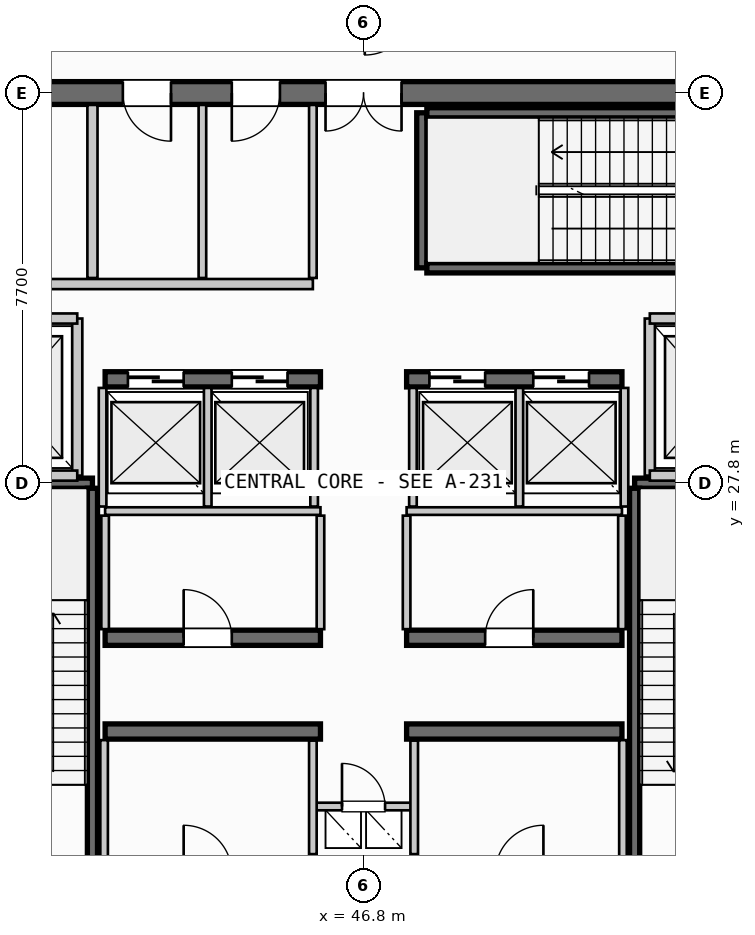
"""IFC4 building model, lengths in metres.
Left out: names, types, materials, properties, quantities, classifications, styles, units other than length and angle.
Written with IfcOpenShell. Run it as: python <this file> out.ifc"""

import sys

from ifc_helpers import new_model, si_unit, direction, frame, frame_2d, origin, place, context, subcontext, project, spatial, rectangle, extrude, source, transform, mapped, element, fill, save


model = new_model("IFC4")
c1 = context("Model", 3, precision=1e-05, world=origin(), true_north=direction((0.0, 1.0)))
c2 = subcontext(c1, "Body", "Model", "MODEL_VIEW")
j1 = project(units=[si_unit("LENGTHUNIT", "METRE"), si_unit("PLANEANGLEUNIT", "RADIAN")], contexts=[c1])
p1 = place(None, origin())
s1 = spatial("IfcSite", under=j1, at=p1, CompositionType="ELEMENT")
p2 = place(p1, origin())
s2 = spatial("IfcBuilding", under=s1, at=p2, CompositionType="ELEMENT")
p3 = place(p2, frame((0.0, 0.0, 223.6)))
s3 = spatial("IfcBuildingStorey", under=s2, at=p3, CompositionType="ELEMENT", Elevation=223.6)
p4 = place(p3, frame((55.6, 35.5, 0.0), z_axis=(0.0, 0.0, 1.0), x_axis=(-1.0, 0.0, 0.0)))
e1 = element("IfcWall", 1, at=p4, inside=s3, PredefinedType="SHEAR", context=c2, shape_type="SweptSolid", body=[
    extrude(rectangle(XDim=17.6, YDim=0.45, at=frame_2d((8.8, 0.0))), origin(), (0.0, 0.0, 1.0), 4.38),
])
p5 = place(p4, frame((8.05, 0.0, 0.0)))
e2 = element("IfcOpeningElement", 2, at=p5, cuts=e1, PredefinedType="OPENING", context=c2, shape_type="SweptSolid", body=[
    extrude(rectangle(XDim=1.5, YDim=2.2, at=frame_2d((0.75, 1.1))), frame((0.0, 0.235, 0.0), z_axis=(0.0, -1.0, 0.0), x_axis=(1.0, 0.0, 0.0)), (0.0, 0.0, 1.0), 0.47),
])
p6 = place(p4, frame((15.1, 0.0, 0.0)))
e3 = element("IfcOpeningElement", 3, at=p6, cuts=e1, PredefinedType="OPENING", context=c2, shape_type="SweptSolid", body=[
    extrude(rectangle(XDim=0.95, YDim=2.15, at=frame_2d((0.475, 1.075))), frame((0.0, 0.235, 0.0), z_axis=(0.0, -1.0, 0.0), x_axis=(1.0, 0.0, 0.0)), (0.0, 0.0, 1.0), 0.47),
])
p7 = place(p4, frame((12.6, 0.0, 0.0)))
e4 = element("IfcOpeningElement", 4, at=p7, cuts=e1, PredefinedType="OPENING", context=c2, shape_type="SweptSolid", body=[
    extrude(rectangle(XDim=0.95, YDim=2.15, at=frame_2d((0.475, 1.075))), frame((0.0, 0.235, 0.0), z_axis=(0.0, -1.0, 0.0), x_axis=(1.0, 0.0, 0.0)), (0.0, 0.0, 1.0), 0.47),
])
p8 = place(p4, frame((10.45, 0.0, 0.0)))
e5 = element("IfcOpeningElement", 5, at=p8, cuts=e1, PredefinedType="OPENING", context=c2, shape_type="SweptSolid", body=[
    extrude(rectangle(XDim=0.95, YDim=2.15, at=frame_2d((0.475, 1.075))), frame((0.0, 0.235, 0.0), z_axis=(0.0, -1.0, 0.0), x_axis=(1.0, 0.0, 0.0)), (0.0, 0.0, 1.0), 0.47),
])
for number, where, z_axis, x_axis in (
    (6, (41.7, 22.9, 0.0), (0.0, 0.0, 1.0), (1.0, 0.0, 0.0)),
    (7, (47.65, 22.9, 0.0), (0.0, 0.0, 1.0), (1.0, 0.0, 0.0)),
):
    element("IfcWall", number, at=place(p3, frame(where, z_axis=z_axis, x_axis=x_axis)), inside=s3, PredefinedType="SHEAR", context=c2, shape_type="SweptSolid", body=[
        extrude(rectangle(XDim=4.25, YDim=0.3, at=frame_2d((2.125, 0.0))), origin(), (0.0, 0.0, 1.0), 4.38),
    ])
p9 = place(p3, frame((41.7, 24.75, 0.0), z_axis=(0.0, 0.0, 1.0), x_axis=(1.0, 0.0, 0.0)))
e8 = element("IfcWall", 8, at=p9, inside=s3, PredefinedType="SHEAR", context=c2, shape_type="SweptSolid", body=[
    extrude(rectangle(XDim=4.25, YDim=0.3, at=frame_2d((2.125, 0.0))), origin(), (0.0, 0.0, 1.0), 4.38),
])
p10 = place(p9, frame((1.55, 0.0, 0.0)))
e9 = element("IfcOpeningElement", 9, at=p10, cuts=e8, PredefinedType="OPENING", context=c2, shape_type="SweptSolid", body=[
    extrude(rectangle(XDim=0.95, YDim=2.15, at=frame_2d((0.475, 1.075))), frame((0.0, 0.16, 0.0), z_axis=(0.0, -1.0, 0.0), x_axis=(1.0, 0.0, 0.0)), (0.0, 0.0, 1.0), 0.32),
])
p11 = place(p3, frame((47.65, 24.75, 0.0), z_axis=(0.0, 0.0, 1.0), x_axis=(1.0, 0.0, 0.0)))
e10 = element("IfcWall", 10, at=p11, inside=s3, PredefinedType="SHEAR", context=c2, shape_type="SweptSolid", body=[
    extrude(rectangle(XDim=4.25, YDim=0.3, at=frame_2d((2.125, 0.0))), origin(), (0.0, 0.0, 1.0), 4.38),
])
p12 = place(p11, frame((1.55, 0.0, 0.0)))
e11 = element("IfcOpeningElement", 11, at=p12, cuts=e10, PredefinedType="OPENING", context=c2, shape_type="SweptSolid", body=[
    extrude(rectangle(XDim=0.95, YDim=2.15, at=frame_2d((0.475, 1.075))), frame((0.0, 0.16, 0.0), z_axis=(0.0, -1.0, 0.0), x_axis=(1.0, 0.0, 0.0)), (0.0, 0.0, 1.0), 0.32),
])
p13 = place(p3, frame((41.7, 29.85, 0.0), z_axis=(0.0, 0.0, 1.0), x_axis=(1.0, 0.0, 0.0)))
e12 = element("IfcWall", 12, at=p13, inside=s3, PredefinedType="SHEAR", context=c2, shape_type="SweptSolid", body=[
    extrude(rectangle(XDim=4.25, YDim=0.3, at=frame_2d((2.125, 0.0))), origin(), (0.0, 0.0, 1.0), 4.38),
])
p14 = place(p13, frame((0.45, 0.0, 0.0)))
e13 = element("IfcOpeningElement", 13, at=p14, cuts=e12, PredefinedType="OPENING", context=c2, shape_type="SweptSolid", body=[
    extrude(rectangle(XDim=1.1, YDim=2.2, at=frame_2d((0.55, 1.1))), frame((0.0, 0.16, 0.0), z_axis=(0.0, -1.0, 0.0), x_axis=(1.0, 0.0, 0.0)), (0.0, 0.0, 1.0), 0.32),
])
p15 = place(p13, frame((2.5, 0.0, 0.0)))
e14 = element("IfcOpeningElement", 14, at=p15, cuts=e12, PredefinedType="OPENING", context=c2, shape_type="SweptSolid", body=[
    extrude(rectangle(XDim=1.1, YDim=2.2, at=frame_2d((0.55, 1.1))), frame((0.0, 0.16, 0.0), z_axis=(0.0, -1.0, 0.0), x_axis=(1.0, 0.0, 0.0)), (0.0, 0.0, 1.0), 0.32),
])
p16 = place(p3, frame((47.65, 29.85, 0.0), z_axis=(0.0, 0.0, 1.0), x_axis=(1.0, 0.0, 0.0)))
e15 = element("IfcWall", 15, at=p16, inside=s3, PredefinedType="SHEAR", context=c2, shape_type="SweptSolid", body=[
    extrude(rectangle(XDim=4.25, YDim=0.3, at=frame_2d((2.125, 0.0))), origin(), (0.0, 0.0, 1.0), 4.38),
])
p17 = place(p16, frame((0.45, 0.0, 0.0)))
e16 = element("IfcOpeningElement", 16, at=p17, cuts=e15, PredefinedType="OPENING", context=c2, shape_type="SweptSolid", body=[
    extrude(rectangle(XDim=1.1, YDim=2.2, at=frame_2d((0.55, 1.1))), frame((0.0, 0.16, 0.0), z_axis=(0.0, -1.0, 0.0), x_axis=(1.0, 0.0, 0.0)), (0.0, 0.0, 1.0), 0.32),
])
p18 = place(p16, frame((2.5, 0.0, 0.0)))
e17 = element("IfcOpeningElement", 17, at=p18, cuts=e15, PredefinedType="OPENING", context=c2, shape_type="SweptSolid", body=[
    extrude(rectangle(XDim=1.1, YDim=2.2, at=frame_2d((0.55, 1.1))), frame((0.0, 0.16, 0.0), z_axis=(0.0, -1.0, 0.0), x_axis=(1.0, 0.0, 0.0)), (0.0, 0.0, 1.0), 0.32),
])
p19 = place(p3, frame((38.39, 27.8, 0.0), z_axis=(0.0, 0.0, 1.0), x_axis=(1.0, 0.0, 0.0)))
e18 = element("IfcWall", 18, at=p19, inside=s3, PredefinedType="SHEAR", context=c2, shape_type="SweptSolid", body=[
    extrude(rectangle(XDim=3.06, YDim=0.2, at=frame_2d((1.53, 0.0))), origin(), (0.0, 0.0, 1.0), 4.38),
])
p20 = place(p3, frame((41.45, 27.7, 0.0), z_axis=(0.0, 0.0, 1.0), x_axis=(0.0, -1.0, 0.0)))
e19 = element("IfcWall", 19, at=p20, inside=s3, PredefinedType="SHEAR", context=c2, shape_type="SweptSolid", body=[
    extrude(rectangle(XDim=7.35, YDim=0.2, at=frame_2d((3.675, 0.0))), origin(), (0.0, 0.0, 1.0), 4.38),
])
p21 = place(p3, frame((52.15, 27.8, 0.0), z_axis=(0.0, 0.0, 1.0), x_axis=(1.0, 0.0, 0.0)))
e20 = element("IfcWall", 20, at=p21, inside=s3, PredefinedType="SHEAR", context=c2, shape_type="SweptSolid", body=[
    extrude(rectangle(XDim=3.06, YDim=0.2, at=frame_2d((1.53, 0.0))), origin(), (0.0, 0.0, 1.0), 4.38),
])
p22 = place(p3, frame((52.15, 20.35, 0.0), z_axis=(0.0, 0.0, 1.0), x_axis=(0.0, 1.0, 0.0)))
e21 = element("IfcWall", 21, at=p22, inside=s3, PredefinedType="SHEAR", context=c2, shape_type="SweptSolid", body=[
    extrude(rectangle(XDim=7.35, YDim=0.2, at=frame_2d((3.675, 0.0))), origin(), (0.0, 0.0, 1.0), 4.38),
])
p23 = place(p3, frame((47.95, 32.05, 0.0), z_axis=(0.0, 0.0, 1.0), x_axis=(0.0, 1.0, 0.0)))
e22 = element("IfcWall", 22, at=p23, inside=s3, PredefinedType="SHEAR", context=c2, shape_type="SweptSolid", body=[
    extrude(rectangle(XDim=3.06, YDim=0.2, at=frame_2d((1.53, 0.0))), origin(), (0.0, 0.0, 1.0), 4.38),
])
for number, where, z_axis, x_axis in (
    (23, (48.05, 35.11, 0.0), (0.0, 0.0, 1.0), (1.0, 0.0, 0.0)),
    (24, (55.4, 32.05, 0.0), (0.0, 0.0, 1.0), (-1.0, 0.0, 0.0)),
):
    element("IfcWall", number, at=place(p3, frame(where, z_axis=z_axis, x_axis=x_axis)), inside=s3, PredefinedType="SHEAR", context=c2, shape_type="SweptSolid", body=[
        extrude(rectangle(XDim=7.35, YDim=0.2, at=frame_2d((3.675, 0.0))), origin(), (0.0, 0.0, 1.0), 4.38),
    ])
p24 = place(p3, frame((45.8, 21.42, 0.0), z_axis=(0.0, 0.0, 1.0), x_axis=(1.0, 0.0, 0.0)))
e25 = element("IfcWall", 25, at=p24, inside=s3, PredefinedType="PARTITIONING", context=c2, shape_type="SweptSolid", body=[
    extrude(rectangle(XDim=2.0, YDim=0.15, at=frame_2d((1.0, 0.0))), origin(), (0.0, 0.0, 1.0), 2.455),
])
p25 = place(p24, frame((0.575, 0.0, 0.0)))
e26 = element("IfcOpeningElement", 26, at=p25, cuts=e25, PredefinedType="OPENING", context=c2, shape_type="SweptSolid", body=[
    extrude(rectangle(XDim=0.85, YDim=2.15, at=frame_2d((0.425, 1.075))), frame((0.0, 0.085, 0.0), z_axis=(0.0, -1.0, 0.0), x_axis=(1.0, 0.0, 0.0)), (0.0, 0.0, 1.0), 0.17),
])
for number, where, z_axis, x_axis in (
    (27, (45.8, 20.48, 0.0), (0.0, 0.0, 1.0), (0.0, 1.0, 0.0)),
    (28, (47.8, 20.48, 0.0), (0.0, 0.0, 1.0), (0.0, 1.0, 0.0)),
):
    element("IfcWall", number, at=place(p3, frame(where, z_axis=z_axis, x_axis=x_axis)), inside=s3, PredefinedType="PARTITIONING", context=c2, shape_type="SweptSolid", body=[
        extrude(rectangle(XDim=2.24, YDim=0.15, at=frame_2d((1.12, 0.0))), origin(), (0.0, 0.0, 1.0), 2.455),
    ])
p26 = place(p3, frame((41.15, 27.95, 0.0), z_axis=(0.0, 0.0, 1.0), x_axis=(0.0, 1.0, 0.0)))
e29 = element("IfcWall", 29, at=p26, inside=s3, PredefinedType="PARTITIONING", context=c2, shape_type="SweptSolid", body=[
    extrude(rectangle(XDim=3.1, YDim=0.2, at=frame_2d((1.55, 0.0))), origin(), (0.0, 0.0, 1.0), 2.455),
])
for number, where, z_axis, x_axis in (
    (30, (38.235, 27.95, 0.0), (0.0, 0.0, 1.0), (1.0, 0.0, 0.0)),
    (31, (38.235, 31.05, 0.0), (0.0, 0.0, 1.0), (1.0, 0.0, 0.0)),
):
    element("IfcWall", number, at=place(p3, frame(where, z_axis=z_axis, x_axis=x_axis)), inside=s3, PredefinedType="PARTITIONING", context=c2, shape_type="SweptSolid", body=[
        extrude(rectangle(XDim=2.915, YDim=0.2, at=frame_2d((1.458, 0.0))), origin(), (0.0, 0.0, 1.0), 2.455),
    ])
p27 = place(p3, frame((52.45, 27.95, 0.0), z_axis=(0.0, 0.0, 1.0), x_axis=(0.0, 1.0, 0.0)))
e32 = element("IfcWall", 32, at=p27, inside=s3, PredefinedType="PARTITIONING", context=c2, shape_type="SweptSolid", body=[
    extrude(rectangle(XDim=3.1, YDim=0.2, at=frame_2d((1.55, 0.0))), origin(), (0.0, 0.0, 1.0), 2.455),
])
for number, where, z_axis, x_axis in (
    (33, (52.45, 27.95, 0.0), (0.0, 0.0, 1.0), (1.0, 0.0, 0.0)),
    (34, (52.45, 31.05, 0.0), (0.0, 0.0, 1.0), (1.0, 0.0, 0.0)),
):
    element("IfcWall", number, at=place(p3, frame(where, z_axis=z_axis, x_axis=x_axis)), inside=s3, PredefinedType="PARTITIONING", context=c2, shape_type="SweptSolid", body=[
        extrude(rectangle(XDim=2.915, YDim=0.2, at=frame_2d((1.458, 0.0))), origin(), (0.0, 0.0, 1.0), 2.455),
    ])
for number, where, z_axis, x_axis in (
    (35, (41.68, 20.335, 0.0), (0.0, 0.0, 1.0), (0.0, 1.0, 0.0)),
    (36, (51.92, 20.335, 0.0), (0.0, 0.0, 1.0), (0.0, 1.0, 0.0)),
):
    element("IfcWall", number, at=place(p3, frame(where, z_axis=z_axis, x_axis=x_axis)), inside=s3, PredefinedType="PARTITIONING", context=c2, shape_type="SweptSolid", body=[
        extrude(rectangle(XDim=2.395, YDim=0.15, at=frame_2d((1.198, 0.0))), origin(), (0.0, 0.0, 1.0), 2.455),
    ])
for number, where, z_axis, x_axis in (
    (37, (41.7, 27.25, 0.0), (0.0, 0.0, 1.0), (1.0, 0.0, 0.0)),
    (38, (47.65, 27.25, 0.0), (0.0, 0.0, 1.0), (1.0, 0.0, 0.0)),
):
    element("IfcWall", number, at=place(p3, frame(where, z_axis=z_axis, x_axis=x_axis)), inside=s3, PredefinedType="PARTITIONING", context=c2, shape_type="SweptSolid", body=[
        extrude(rectangle(XDim=4.25, YDim=0.15, at=frame_2d((2.125, 0.0))), origin(), (0.0, 0.0, 1.0), 2.455),
    ])
for number, where, z_axis, x_axis in (
    (39, (41.7, 24.92, 0.0), (0.0, 0.0, 1.0), (0.0, 1.0, 0.0)),
    (40, (45.95, 24.92, 0.0), (0.0, 0.0, 1.0), (0.0, 1.0, 0.0)),
    (41, (47.65, 24.92, 0.0), (0.0, 0.0, 1.0), (0.0, 1.0, 0.0)),
    (42, (51.9, 24.92, 0.0), (0.0, 0.0, 1.0), (0.0, 1.0, 0.0)),
):
    element("IfcWall", number, at=place(p3, frame(where, z_axis=z_axis, x_axis=x_axis)), inside=s3, PredefinedType="PARTITIONING", context=c2, shape_type="SweptSolid", body=[
        extrude(rectangle(XDim=2.24, YDim=0.15, at=frame_2d((1.12, 0.0))), origin(), (0.0, 0.0, 1.0), 2.455),
    ])
for number, where, z_axis, x_axis in (
    (43, (41.65, 27.34, 0.0), (0.0, 0.0, 1.0), (0.0, 1.0, 0.0)),
    (44, (43.725, 27.34, 0.0), (0.0, 0.0, 1.0), (0.0, 1.0, 0.0)),
    (45, (45.825, 27.34, 0.0), (0.0, 0.0, 1.0), (0.0, 1.0, 0.0)),
    (46, (47.775, 27.34, 0.0), (0.0, 0.0, 1.0), (0.0, 1.0, 0.0)),
    (47, (49.875, 27.34, 0.0), (0.0, 0.0, 1.0), (0.0, 1.0, 0.0)),
    (48, (51.95, 27.34, 0.0), (0.0, 0.0, 1.0), (0.0, 1.0, 0.0)),
):
    element("IfcWall", number, at=place(p3, frame(where, z_axis=z_axis, x_axis=x_axis)), inside=s3, PredefinedType="PARTITIONING", context=c2, shape_type="SweptSolid", body=[
        extrude(rectangle(XDim=2.34, YDim=0.15, at=frame_2d((1.17, 0.0))), origin(), (0.0, 0.0, 1.0), 2.455),
    ])
p28 = place(p3, frame((41.45, 31.85, 0.0), z_axis=(0.0, 0.0, 1.0), x_axis=(0.0, 1.0, 0.0)))
e49 = element("IfcWall", 49, at=p28, inside=s3, PredefinedType="PARTITIONING", context=c2, shape_type="SweptSolid", body=[
    extrude(rectangle(XDim=3.415, YDim=0.2, at=frame_2d((1.708, 0.0))), origin(), (0.0, 0.0, 1.0), 2.455),
])
p29 = place(p3, frame((38.235, 31.73, 0.0), z_axis=(0.0, 0.0, 1.0), x_axis=(1.0, 0.0, 0.0)))
e50 = element("IfcWall", 50, at=p29, inside=s3, PredefinedType="PARTITIONING", context=c2, shape_type="SweptSolid", body=[
    extrude(rectangle(XDim=7.565, YDim=0.2, at=frame_2d((3.782, 0.0))), origin(), (0.0, 0.0, 1.0), 2.455),
])
p30 = place(p3, frame((45.8, 31.85, 0.0), z_axis=(0.0, 0.0, 1.0), x_axis=(0.0, 1.0, 0.0)))
e51 = element("IfcWall", 51, at=p30, inside=s3, PredefinedType="PARTITIONING", context=c2, shape_type="SweptSolid", body=[
    extrude(rectangle(XDim=3.415, YDim=0.15, at=frame_2d((1.708, 0.0))), origin(), (0.0, 0.0, 1.0), 2.455),
])
p31 = place(p3, frame((43.62, 31.85, 0.0), z_axis=(0.0, 0.0, 1.0), x_axis=(0.0, 1.0, 0.0)))
e52 = element("IfcWall", 52, at=p31, inside=s3, PredefinedType="PLUMBINGWALL", context=c2, shape_type="SweptSolid", body=[
    extrude(rectangle(XDim=3.415, YDim=0.15, at=frame_2d((1.708, 0.0))), origin(), (0.0, 0.0, 1.0), 2.455),
])
m1 = source(origin(), c2, "Body", "SweptSolid", [
    extrude(rectangle(XDim=1.5, YDim=2.2, at=frame_2d((0.75, 1.1))), frame((0.0, 0.025, 0.0), z_axis=(0.0, -1.0, 0.0), x_axis=(1.0, 0.0, 0.0)), (0.0, 0.0, 1.0), 0.05),
])
p32 = place(p5, origin())
e53 = element("IfcDoor", 53, at=p32, inside=s3, OperationType="DOUBLE_DOOR_SINGLE_SWING", PredefinedType="DOOR", context=c2, shape_type="MappedRepresentation", body=[
    mapped(m1, transform((0.0, 0.0, 0.0), scale=1.0)),
])
fill(e2, e53)
m2 = source(origin(), c2, "Body", "SweptSolid", [
    extrude(rectangle(XDim=0.95, YDim=2.15, at=frame_2d((0.475, 1.075))), frame((0.0, 0.025, 0.0), z_axis=(0.0, -1.0, 0.0), x_axis=(1.0, 0.0, 0.0)), (0.0, 0.0, 1.0), 0.05),
])
p33 = place(p10, origin())
e54 = element("IfcDoor", 54, at=p33, inside=s3, OperationType="SINGLE_SWING_LEFT", PredefinedType="DOOR", context=c2, shape_type="MappedRepresentation", body=[
    mapped(m2, transform((0.0, 0.0, 0.0), scale=1.0)),
])
fill(e9, e54)
p34 = place(p12, origin())
e55 = element("IfcDoor", 55, at=p34, inside=s3, OperationType="SINGLE_SWING_RIGHT", PredefinedType="DOOR", context=c2, shape_type="MappedRepresentation", body=[
    mapped(m2, transform((0.0, 0.0, 0.0), scale=1.0)),
])
fill(e11, e55)
m3 = source(origin(), c2, "Body", "SweptSolid", [
    extrude(rectangle(XDim=1.1, YDim=2.2, at=frame_2d((0.55, 1.1))), frame((0.0, 0.025, 0.0), z_axis=(0.0, -1.0, 0.0), x_axis=(1.0, 0.0, 0.0)), (0.0, 0.0, 1.0), 0.05),
])
p35 = place(p14, origin())
e56 = element("IfcDoor", 56, at=p35, inside=s3, OperationType="SLIDING_TO_LEFT", PredefinedType="DOOR", context=c2, shape_type="MappedRepresentation", body=[
    mapped(m3, transform((0.0, 0.0, 0.0), scale=1.0)),
])
fill(e13, e56)
p36 = place(p15, origin())
e57 = element("IfcDoor", 57, at=p36, inside=s3, OperationType="SLIDING_TO_LEFT", PredefinedType="DOOR", context=c2, shape_type="MappedRepresentation", body=[
    mapped(m3, transform((0.0, 0.0, 0.0), scale=1.0)),
])
fill(e14, e57)
p37 = place(p17, origin())
e58 = element("IfcDoor", 58, at=p37, inside=s3, OperationType="SLIDING_TO_LEFT", PredefinedType="DOOR", context=c2, shape_type="MappedRepresentation", body=[
    mapped(m3, transform((0.0, 0.0, 0.0), scale=1.0)),
])
fill(e16, e58)
p38 = place(p18, origin())
e59 = element("IfcDoor", 59, at=p38, inside=s3, OperationType="SLIDING_TO_LEFT", PredefinedType="DOOR", context=c2, shape_type="MappedRepresentation", body=[
    mapped(m3, transform((0.0, 0.0, 0.0), scale=1.0)),
])
fill(e17, e59)
p39 = place(p7, origin())
e60 = element("IfcDoor", 60, at=p39, inside=s3, OperationType="SINGLE_SWING_LEFT", PredefinedType="DOOR", context=c2, shape_type="MappedRepresentation", body=[
    mapped(m2, transform((0.0, 0.0, 0.0), scale=1.0)),
])
fill(e4, e60)
p40 = place(p8, origin())
e61 = element("IfcDoor", 61, at=p40, inside=s3, OperationType="SINGLE_SWING_RIGHT", PredefinedType="DOOR", context=c2, shape_type="MappedRepresentation", body=[
    mapped(m2, transform((0.0, 0.0, 0.0), scale=1.0)),
])
fill(e5, e61)
m4 = source(origin(), c2, "Body", "SweptSolid", [
    extrude(rectangle(XDim=0.85, YDim=2.15, at=frame_2d((0.425, 1.075))), frame((0.0, 0.025, 0.0), z_axis=(0.0, -1.0, 0.0), x_axis=(1.0, 0.0, 0.0)), (0.0, 0.0, 1.0), 0.05),
])
p41 = place(p25, origin())
e62 = element("IfcDoor", 62, at=p41, inside=s3, OperationType="SINGLE_SWING_LEFT", PredefinedType="DOOR", context=c2, shape_type="MappedRepresentation", body=[
    mapped(m4, transform((0.0, 0.0, 0.0), scale=1.0)),
])
fill(e26, e62)
save(model, sys.argv[1])
